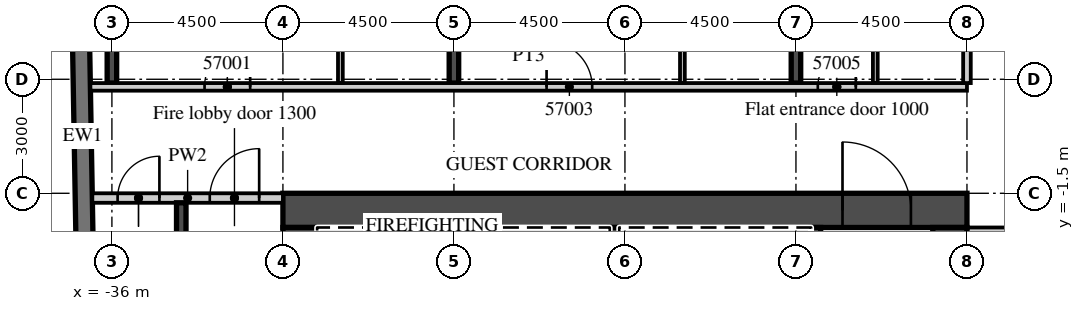
"""IFC4 building model, lengths in metres.
Left out: names, types, materials, properties, quantities, classifications, styles, units other than length and angle.
Written with IfcOpenShell. Run it as: python <this file> out.ifc"""

import sys

from ifc_helpers import new_model, si_unit, direction, frame, frame_2d, origin, place, context, subcontext, project, spatial, rectangle, extrude, element, fill, save


model = new_model("IFC4")
c1 = context("Model", 3, precision=1e-05, world=origin(), true_north=direction((0.0, 1.0)))
c2 = subcontext(c1, "Body", "Model", "MODEL_VIEW")
j1 = project(units=[si_unit("LENGTHUNIT", "METRE"), si_unit("PLANEANGLEUNIT", "RADIAN")], contexts=[c1])
p1 = place(None, origin())
s1 = spatial("IfcSite", under=j1, at=p1, CompositionType="ELEMENT")
p2 = place(p1, origin())
s2 = spatial("IfcBuilding", under=s1, at=p2, CompositionType="ELEMENT")
p3 = place(p2, frame((0.0, 0.0, 234.2)))
s3 = spatial("IfcBuildingStorey", under=s2, at=p3, CompositionType="ELEMENT", Elevation=234.2)
p4 = place(p3, frame((-36.0, 1.4, 0.0), z_axis=(0.0, 0.0, 1.0), x_axis=(0.0, 1.0, 0.0)))
e1 = element("IfcWall", 1, at=p4, inside=s3, PredefinedType="SHEAR", context=c2, shape_type="SweptSolid", body=[
    extrude(rectangle(XDim=17.125, YDim=0.25, at=frame_2d((8.563, 0.0))), origin(), (0.0, 0.0, 1.0), 3.3),
])
p5 = place(p3, frame((-27.0, 1.4, 0.0), z_axis=(0.0, 0.0, 1.0), x_axis=(0.0, 1.0, 0.0)))
e2 = element("IfcWall", 2, at=p5, inside=s3, PredefinedType="SHEAR", context=c2, shape_type="SweptSolid", body=[
    extrude(rectangle(XDim=18.817, YDim=0.25, at=frame_2d((9.409, 0.0))), origin(), (0.0, 0.0, 1.0), 3.3),
])
p6 = place(p3, frame((-18.0, 1.4, 0.0), z_axis=(0.0, 0.0, 1.0), x_axis=(0.0, 1.0, 0.0)))
e3 = element("IfcWall", 3, at=p6, inside=s3, PredefinedType="SHEAR", context=c2, shape_type="SweptSolid", body=[
    extrude(rectangle(XDim=18.974, YDim=0.25, at=frame_2d((9.487, 0.0))), origin(), (0.0, 0.0, 1.0), 3.3),
])
p7 = place(p3, frame((-37.057, 16.503, 0.0), z_axis=(0.0, 0.0, 1.0), x_axis=(0.017452279857, -0.999847697366, 0.0)))
e4 = element("IfcWall", 4, at=p7, inside=s3, PredefinedType="SOLIDWALL", context=c2, shape_type="SweptSolid", body=[
    extrude(rectangle(XDim=33.0, YDim=0.45, at=frame_2d((16.5, 0.0))), origin(), (0.0, 0.0, 1.0), 3.02),
])
p8 = place(p3, frame((-36.566, 1.3, 0.0), z_axis=(0.0, 0.0, 1.0), x_axis=(1.0, 0.0, 0.0)))
e5 = element("IfcWall", 5, at=p8, inside=s3, PredefinedType="PARTITIONING", context=c2, shape_type="SweptSolid", body=[
    extrude(rectangle(XDim=23.066, YDim=0.2, at=frame_2d((11.533, 0.0))), origin(), (0.0, 0.0, 1.0), 3.02),
])
p9 = place(p8, frame((3.004, 0.0, 0.0)))
e6 = element("IfcOpeningElement", 6, at=p9, cuts=e5, PredefinedType="OPENING", context=c2, shape_type="SweptSolid", body=[
    extrude(rectangle(XDim=1.2, YDim=2.1, at=frame_2d((0.6, 1.05))), frame((0.0, 0.11, 0.0), z_axis=(0.0, -1.0, 0.0), x_axis=(1.0, 0.0, 0.0)), (0.0, 0.0, 1.0), 0.22),
])
p10 = place(p8, frame((12.004, 0.0, 0.0)))
e7 = element("IfcOpeningElement", 7, at=p10, cuts=e5, PredefinedType="OPENING", context=c2, shape_type="SweptSolid", body=[
    extrude(rectangle(XDim=1.2, YDim=2.1, at=frame_2d((0.6, 1.05))), frame((0.0, 0.11, 0.0), z_axis=(0.0, -1.0, 0.0), x_axis=(1.0, 0.0, 0.0)), (0.0, 0.0, 1.0), 0.22),
])
p11 = place(p8, frame((19.141, 0.0, 0.0)))
e8 = element("IfcOpeningElement", 8, at=p11, cuts=e5, PredefinedType="OPENING", context=c2, shape_type="SweptSolid", body=[
    extrude(rectangle(XDim=1.0, YDim=2.1, at=frame_2d((0.5, 1.05))), frame((0.0, 0.11, 0.0), z_axis=(0.0, -1.0, 0.0), x_axis=(1.0, 0.0, 0.0)), (0.0, 0.0, 1.0), 0.22),
])
p12 = place(p3, frame((-29.988, 1.4, 0.0), z_axis=(0.0, 0.0, 1.0), x_axis=(0.0, 1.0, 0.0)))
e9 = element("IfcWall", 9, at=p12, inside=s3, PredefinedType="PARTITIONING", context=c2, shape_type="SweptSolid", body=[
    extrude(rectangle(XDim=5.725, YDim=0.125, at=frame_2d((2.863, 0.0))), origin(), (0.0, 0.0, 1.0), 3.02),
])
p13 = place(p12, frame((2.45, 0.0, 0.0)))
e10 = element("IfcOpeningElement", 10, at=p13, cuts=e9, PredefinedType="OPENING", context=c2, shape_type="SweptSolid", body=[
    extrude(rectangle(XDim=0.9, YDim=2.1, at=frame_2d((0.45, 1.05))), frame((0.0, 0.073, 0.0), z_axis=(0.0, -1.0, 0.0), x_axis=(1.0, 0.0, 0.0)), (0.0, 0.0, 1.0), 0.145),
])
p14 = place(p3, frame((-20.988, 1.4, 0.0), z_axis=(0.0, 0.0, 1.0), x_axis=(0.0, 1.0, 0.0)))
e11 = element("IfcWall", 11, at=p14, inside=s3, PredefinedType="PARTITIONING", context=c2, shape_type="SweptSolid", body=[
    extrude(rectangle(XDim=5.725, YDim=0.125, at=frame_2d((2.863, 0.0))), origin(), (0.0, 0.0, 1.0), 3.02),
])
p15 = place(p14, frame((2.45, 0.0, 0.0)))
e12 = element("IfcOpeningElement", 12, at=p15, cuts=e11, PredefinedType="OPENING", context=c2, shape_type="SweptSolid", body=[
    extrude(rectangle(XDim=0.9, YDim=2.1, at=frame_2d((0.45, 1.05))), frame((0.0, 0.073, 0.0), z_axis=(0.0, -1.0, 0.0), x_axis=(1.0, 0.0, 0.0)), (0.0, 0.0, 1.0), 0.145),
])
p16 = place(p3, frame((-13.5, 1.4, 0.0), z_axis=(0.0, 0.0, 1.0), x_axis=(0.0, 1.0, 0.0)))
e13 = element("IfcWall", 13, at=p16, inside=s3, PredefinedType="PARTITIONING", context=c2, shape_type="SweptSolid", body=[
    extrude(rectangle(XDim=19.065, YDim=0.2, at=frame_2d((9.533, 0.0))), origin(), (0.0, 0.0, 1.0), 3.02),
])
p17 = place(p3, frame((-15.912, 1.4, 0.0), z_axis=(0.0, 0.0, 1.0), x_axis=(0.0, 1.0, 0.0)))
e14 = element("IfcWall", 14, at=p17, inside=s3, PredefinedType="PARTITIONING", context=c2, shape_type="SweptSolid", body=[
    extrude(rectangle(XDim=5.725, YDim=0.125, at=frame_2d((2.863, 0.0))), origin(), (0.0, 0.0, 1.0), 3.02),
])
p18 = place(p17, frame((2.45, 0.0, 0.0)))
e15 = element("IfcOpeningElement", 15, at=p18, cuts=e14, PredefinedType="OPENING", context=c2, shape_type="SweptSolid", body=[
    extrude(rectangle(XDim=0.9, YDim=2.1, at=frame_2d((0.45, 1.05))), frame((0.0, 0.073, 0.0), z_axis=(0.0, -1.0, 0.0), x_axis=(1.0, 0.0, 0.0)), (0.0, 0.0, 1.0), 0.145),
])
p19 = place(p3, frame((-13.5, -2.5, 0.0), z_axis=(0.0, 0.0, 1.0), x_axis=(1.0, 0.0, 0.0)))
e16 = element("IfcWall", 16, at=p19, inside=s3, PredefinedType="PARTITIONING", context=c2, shape_type="SweptSolid", body=[
    extrude(rectangle(XDim=27.0, YDim=0.2, at=frame_2d((13.5, 0.0))), origin(), (0.0, 0.0, 1.0), 3.02),
])
p20 = place(p19, frame((2.925, 0.0, 0.0)))
e17 = element("IfcOpeningElement", 17, at=p20, cuts=e16, PredefinedType="OPENING", context=c2, shape_type="SweptSolid", body=[
    extrude(rectangle(XDim=1.0, YDim=2.1, at=frame_2d((0.5, 1.05))), frame((0.0, 0.11, 0.0), z_axis=(0.0, -1.0, 0.0), x_axis=(1.0, 0.0, 0.0)), (0.0, 0.0, 1.0), 0.22),
])
p21 = place(p19, frame((9.863, 0.0, 0.0)))
e18 = element("IfcOpeningElement", 18, at=p21, cuts=e16, PredefinedType="OPENING", context=c2, shape_type="SweptSolid", body=[
    extrude(rectangle(XDim=1.2, YDim=2.1, at=frame_2d((0.6, 1.05))), frame((0.0, 0.11, 0.0), z_axis=(0.0, -1.0, 0.0), x_axis=(1.0, 0.0, 0.0)), (0.0, 0.0, 1.0), 0.22),
])
p22 = place(p19, frame((16.45, 0.0, 0.0)))
e19 = element("IfcOpeningElement", 19, at=p22, cuts=e16, PredefinedType="OPENING", context=c2, shape_type="SweptSolid", body=[
    extrude(rectangle(XDim=1.0, YDim=2.1, at=frame_2d((0.5, 1.05))), frame((0.0, 0.11, 0.0), z_axis=(0.0, -1.0, 0.0), x_axis=(1.0, 0.0, 0.0)), (0.0, 0.0, 1.0), 0.22),
])
p23 = place(p19, frame((20.925, 0.0, 0.0)))
e20 = element("IfcOpeningElement", 20, at=p23, cuts=e16, PredefinedType="OPENING", context=c2, shape_type="SweptSolid", body=[
    extrude(rectangle(XDim=1.0, YDim=2.1, at=frame_2d((0.5, 1.05))), frame((0.0, 0.11, 0.0), z_axis=(0.0, -1.0, 0.0), x_axis=(1.0, 0.0, 0.0)), (0.0, 0.0, 1.0), 0.22),
])
p24 = place(p19, frame((25.425, 0.0, 0.0)))
e21 = element("IfcOpeningElement", 21, at=p24, cuts=e16, PredefinedType="OPENING", context=c2, shape_type="SweptSolid", body=[
    extrude(rectangle(XDim=1.0, YDim=2.1, at=frame_2d((0.5, 1.05))), frame((0.0, 0.11, 0.0), z_axis=(0.0, -1.0, 0.0), x_axis=(1.0, 0.0, 0.0)), (0.0, 0.0, 1.0), 0.22),
])
p25 = place(p3, frame((-31.5, -1.95, 0.0), z_axis=(0.0, 0.0, 1.0), x_axis=(1.0, 0.0, 0.0)))
e22 = element("IfcWall", 22, at=p25, inside=s3, PredefinedType="SHEAR", context=c2, shape_type="SweptSolid", body=[
    extrude(rectangle(XDim=18.0, YDim=0.9, at=frame_2d((9.0, 0.0))), origin(), (0.0, 0.0, 1.0), 3.02),
])
p26 = place(p25, frame((14.725, 0.0, 0.0)))
e23 = element("IfcOpeningElement", 23, at=p26, cuts=e22, PredefinedType="OPENING", context=c2, shape_type="SweptSolid", body=[
    extrude(rectangle(XDim=1.8, YDim=2.1, at=frame_2d((0.9, 1.05))), frame((0.0, 0.46, 0.0), z_axis=(0.0, -1.0, 0.0), x_axis=(1.0, 0.0, 0.0)), (0.0, 0.0, 1.0), 0.92),
])
p27 = place(p3, frame((-31.05, -15.2, 0.0), z_axis=(0.0, 0.0, 1.0), x_axis=(0.0, 1.0, 0.0)))
e24 = element("IfcWall", 24, at=p27, inside=s3, PredefinedType="SHEAR", context=c2, shape_type="SweptSolid", body=[
    extrude(rectangle(XDim=12.8, YDim=0.9, at=frame_2d((6.4, 0.0))), origin(), (0.0, 0.0, 1.0), 3.02),
])
p28 = place(p27, frame((11.5, 0.0, 0.0)))
e25 = element("IfcOpeningElement", 25, at=p28, cuts=e24, PredefinedType="OPENING", context=c2, shape_type="SweptSolid", body=[
    extrude(rectangle(XDim=1.1, YDim=2.1, at=frame_2d((0.55, 1.05))), frame((0.0, 0.46, 0.0), z_axis=(0.0, -1.0, 0.0), x_axis=(1.0, 0.0, 0.0)), (0.0, 0.0, 1.0), 0.92),
])
p29 = place(p3, frame((-13.95, -14.6, 0.0), z_axis=(0.0, 0.0, 1.0), x_axis=(0.0, 1.0, 0.0)))
e26 = element("IfcWall", 26, at=p29, inside=s3, PredefinedType="SHEAR", context=c2, shape_type="SweptSolid", body=[
    extrude(rectangle(XDim=12.2, YDim=0.9, at=frame_2d((6.1, 0.0))), origin(), (0.0, 0.0, 1.0), 3.02),
])
p30 = place(p3, frame((-17.475, -5.55, 0.0), z_axis=(0.0, 0.0, 1.0), x_axis=(0.0, 1.0, 0.0)))
e27 = element("IfcWall", 27, at=p30, inside=s3, PredefinedType="SHEAR", context=c2, shape_type="SweptSolid", body=[
    extrude(rectangle(XDim=3.15, YDim=0.25, at=frame_2d((1.575, 0.0))), origin(), (0.0, 0.0, 1.0), 3.02),
])
for number, where, z_axis, x_axis in (
    (28, (-27.975, -5.3, 0.0), (0.0, 0.0, 1.0), (0.0, 1.0, 0.0)),
    (29, (-22.775, -5.3, 0.0), (0.0, 0.0, 1.0), (0.0, 1.0, 0.0)),
):
    element("IfcWall", number, at=place(p3, frame(where, z_axis=z_axis, x_axis=x_axis)), inside=s3, PredefinedType="SHEAR", context=c2, shape_type="SweptSolid", body=[
        extrude(rectangle(XDim=2.9, YDim=0.25, at=frame_2d((1.45, 0.0))), origin(), (0.0, 0.0, 1.0), 3.02),
    ])
p31 = place(p3, frame((-36.515, -1.625, 0.0), z_axis=(0.0, 0.0, 1.0), x_axis=(1.0, 0.0, 0.0)))
e30 = element("IfcWall", 30, at=p31, inside=s3, PredefinedType="PARTITIONING", context=c2, shape_type="SweptSolid", body=[
    extrude(rectangle(XDim=5.015, YDim=0.25, at=frame_2d((2.508, 0.0))), origin(), (0.0, 0.0, 1.0), 3.02),
])
p32 = place(p31, frame((3.09, 0.0, 0.0)))
e31 = element("IfcOpeningElement", 31, at=p32, cuts=e30, PredefinedType="OPENING", context=c2, shape_type="SweptSolid", body=[
    extrude(rectangle(XDim=1.3, YDim=2.1, at=frame_2d((0.65, 1.05))), frame((0.0, 0.135, 0.0), z_axis=(0.0, -1.0, 0.0), x_axis=(1.0, 0.0, 0.0)), (0.0, 0.0, 1.0), 0.27),
])
p33 = place(p31, frame((0.665, 0.0, 0.0)))
e32 = element("IfcOpeningElement", 32, at=p33, cuts=e30, PredefinedType="OPENING", context=c2, shape_type="SweptSolid", body=[
    extrude(rectangle(XDim=1.1, YDim=2.1, at=frame_2d((0.55, 1.05))), frame((0.0, 0.135, 0.0), z_axis=(0.0, -1.0, 0.0), x_axis=(1.0, 0.0, 0.0)), (0.0, 0.0, 1.0), 0.27),
])
p34 = place(p3, frame((-34.175, -10.1, 0.0), z_axis=(0.0, 0.0, 1.0), x_axis=(0.0, 1.0, 0.0)))
e33 = element("IfcWall", 33, at=p34, inside=s3, PredefinedType="SHEAR", context=c2, shape_type="SweptSolid", body=[
    extrude(rectangle(XDim=8.35, YDim=0.25, at=frame_2d((4.175, 0.0))), origin(), (0.0, 0.0, 1.0), 3.02),
])
p35 = place(p9, origin())
e34 = element("IfcDoor", 34, at=p35, inside=s3, OperationType="SINGLE_SWING_RIGHT", PredefinedType="DOOR", context=c2, shape_type="SweptSolid", body=[
    extrude(rectangle(XDim=1.2, YDim=2.1, at=frame_2d((0.6, 1.05))), frame((0.0, 0.025, 0.0), z_axis=(0.0, -1.0, 0.0), x_axis=(1.0, 0.0, 0.0)), (0.0, 0.0, 1.0), 0.05),
])
fill(e6, e34)
p36 = place(p10, origin())
e35 = element("IfcDoor", 35, at=p36, inside=s3, OperationType="SINGLE_SWING_LEFT", PredefinedType="DOOR", context=c2, shape_type="SweptSolid", body=[
    extrude(rectangle(XDim=1.2, YDim=2.1, at=frame_2d((0.6, 1.05))), frame((0.0, 0.025, 0.0), z_axis=(0.0, -1.0, 0.0), x_axis=(1.0, 0.0, 0.0)), (0.0, 0.0, 1.0), 0.05),
])
fill(e7, e35)
p37 = place(p11, origin())
e36 = element("IfcDoor", 36, at=p37, inside=s3, OperationType="SINGLE_SWING_RIGHT", PredefinedType="DOOR", context=c2, shape_type="SweptSolid", body=[
    extrude(rectangle(XDim=1.0, YDim=2.1, at=frame_2d((0.5, 1.05))), frame((0.0, 0.025, 0.0), z_axis=(0.0, -1.0, 0.0), x_axis=(1.0, 0.0, 0.0)), (0.0, 0.0, 1.0), 0.05),
])
fill(e8, e36)
p38 = place(p26, origin())
e37 = element("IfcDoor", 37, at=p38, inside=s3, OperationType="DOUBLE_DOOR_DOUBLE_SWING", PredefinedType="DOOR", context=c2, shape_type="SweptSolid", body=[
    extrude(rectangle(XDim=1.8, YDim=2.1, at=frame_2d((0.9, 1.05))), frame((0.0, 0.025, 0.0), z_axis=(0.0, -1.0, 0.0), x_axis=(1.0, 0.0, 0.0)), (0.0, 0.0, 1.0), 0.05),
])
fill(e23, e37)
p39 = place(p32, origin())
e38 = element("IfcDoor", 38, at=p39, inside=s3, OperationType="SINGLE_SWING_RIGHT", PredefinedType="DOOR", context=c2, shape_type="SweptSolid", body=[
    extrude(rectangle(XDim=1.3, YDim=2.1, at=frame_2d((0.65, 1.05))), frame((0.0, 0.025, 0.0), z_axis=(0.0, -1.0, 0.0), x_axis=(1.0, 0.0, 0.0)), (0.0, 0.0, 1.0), 0.05),
])
fill(e31, e38)
p40 = place(p33, origin())
e39 = element("IfcDoor", 39, at=p40, inside=s3, OperationType="SINGLE_SWING_RIGHT", PredefinedType="DOOR", context=c2, shape_type="SweptSolid", body=[
    extrude(rectangle(XDim=1.1, YDim=2.1, at=frame_2d((0.55, 1.05))), frame((0.0, 0.025, 0.0), z_axis=(0.0, -1.0, 0.0), x_axis=(1.0, 0.0, 0.0)), (0.0, 0.0, 1.0), 0.05),
])
fill(e32, e39)
save(model, sys.argv[1])
